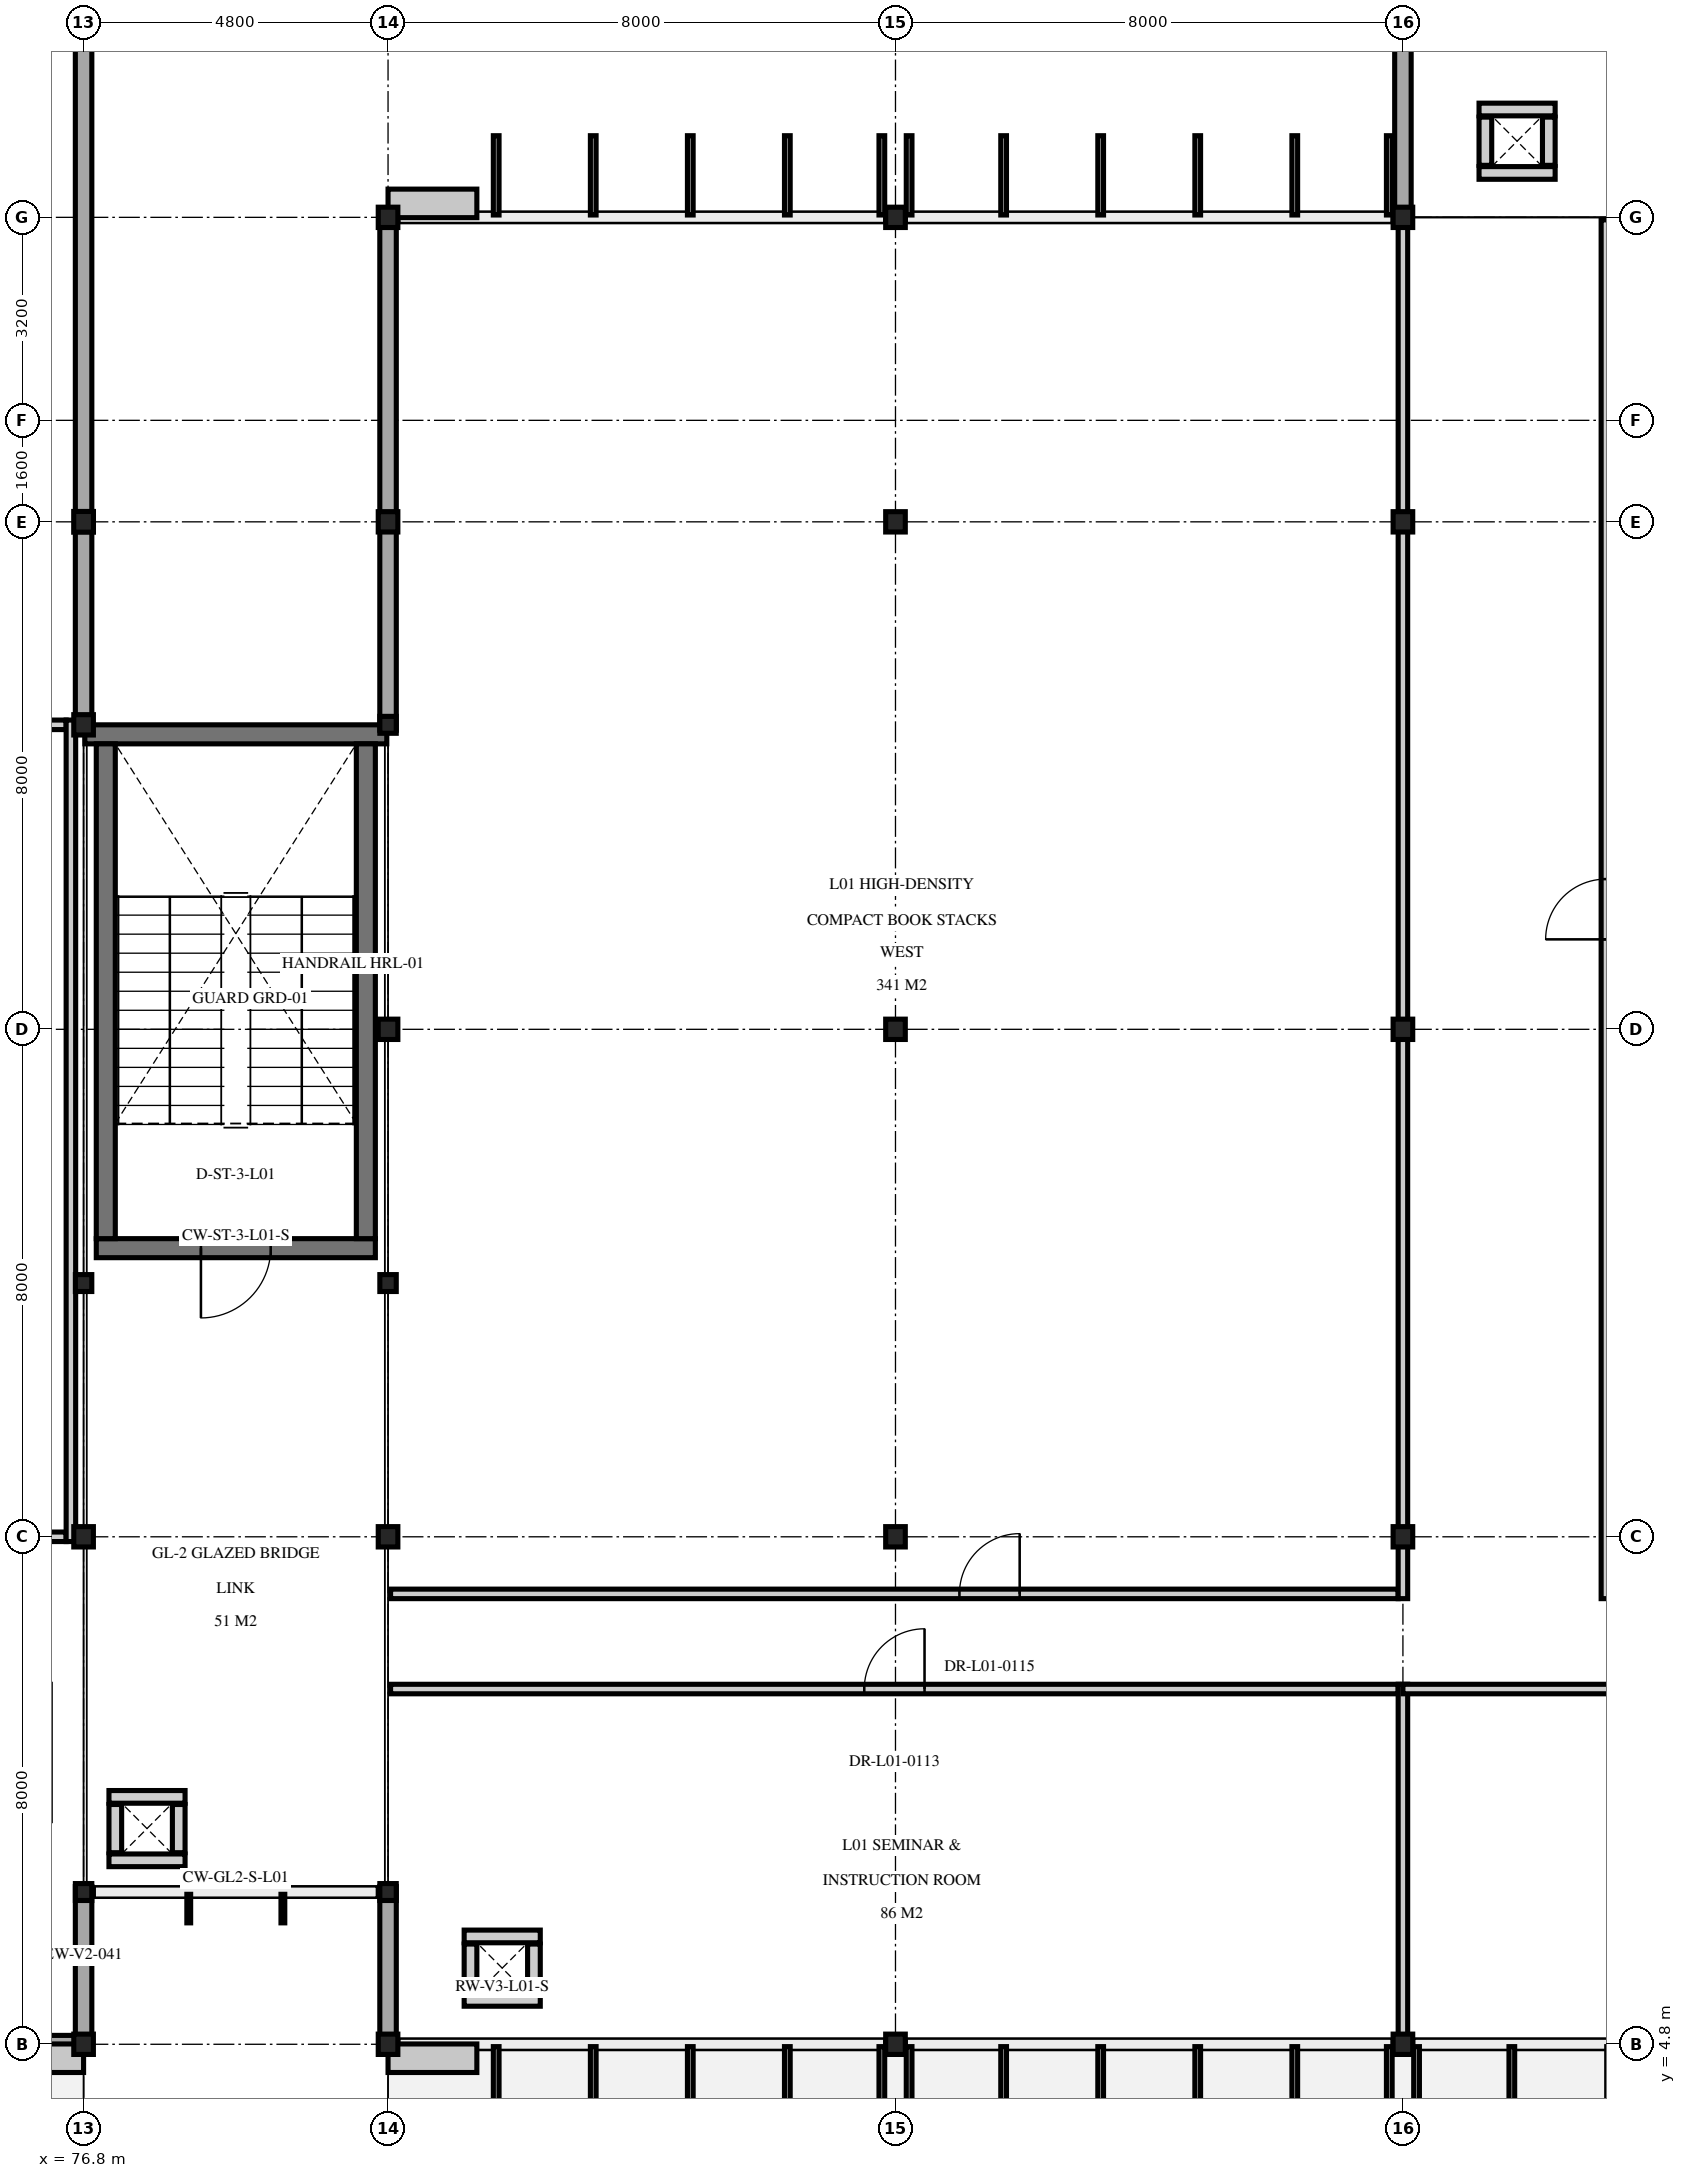
"""IFC4 building model, lengths in metres.
Left out: names, types, materials, properties, quantities, classifications, styles, units other than length and angle.
Written with IfcOpenShell. Run it as: python <this file> out.ifc"""

import sys

from ifc_helpers import new_model, si_unit, direction, frame, frame_2d, origin, origin_2d, place, context, subcontext, project, spatial, rectangle, i_section, extrude, element, fill, save


model = new_model("IFC4")
c1 = context("Model", 3, precision=1e-05, world=origin(), true_north=direction((0.0, 1.0)))
c2 = subcontext(c1, "Body", "Model", "MODEL_VIEW")
j1 = project(units=[si_unit("LENGTHUNIT", "METRE"), si_unit("PLANEANGLEUNIT", "RADIAN")], contexts=[c1])
p1 = place(None, origin())
s1 = spatial("IfcSite", under=j1, at=p1, CompositionType="ELEMENT")
p2 = place(p1, origin())
s2 = spatial("IfcBuilding", under=s1, at=p2, CompositionType="ELEMENT")
p3 = place(p2, frame((0.0, 0.0, 5.1)))
s3 = spatial("IfcBuildingStorey", under=s2, at=p3, CompositionType="ELEMENT", Elevation=5.1)
for number, where, z_axis, x_axis in (
    (1, (76.8, 4.8, 0.0), (0.0, 0.0, 1.0), (1.0, 0.0, 0.0)),
    (2, (76.8, 12.8, 0.0), (0.0, 0.0, 1.0), (1.0, 0.0, 0.0)),
    (3, (76.8, 25.6, 0.0), (0.0, 0.0, 1.0), (1.0, 0.0, 0.0)),
):
    element("IfcColumn", number, at=place(p3, frame(where, z_axis=z_axis, x_axis=x_axis)), inside=s3, PredefinedType="COLUMN", context=c2, shape_type="SweptSolid", body=[
        extrude(i_section(OverallWidth=0.309, OverallDepth=0.321, WebThickness=0.014, FlangeThickness=0.022, at=origin_2d()), origin(), (0.0, 0.0, 1.0), 4.5),
    ])
p4 = place(p3, frame((76.8, 28.8, 0.0), z_axis=(0.0, 0.0, 1.0), x_axis=(1.0, 0.0, 0.0)))
e4 = element("IfcColumn", 4, at=p4, inside=s3, PredefinedType="COLUMN", context=c2, shape_type="SweptSolid", body=[
    extrude(i_section(OverallWidth=0.311, OverallDepth=0.327, WebThickness=0.016, FlangeThickness=0.025, at=origin_2d()), origin(), (0.0, 0.0, 1.0), 4.5),
])
for number, where, z_axis, x_axis in (
    (5, (76.8, 7.2, 0.0), (0.0, 0.0, 1.0), (1.0, 0.0, 0.0)),
    (6, (76.8, 16.8, 0.0), (0.0, 0.0, 1.0), (1.0, 0.0, 0.0)),
):
    element("IfcColumn", number, at=place(p3, frame(where, z_axis=z_axis, x_axis=x_axis)), inside=s3, PredefinedType="COLUMN", context=c2, shape_type="SweptSolid", body=[
        extrude(i_section(OverallWidth=0.259, OverallDepth=0.267, WebThickness=0.013, FlangeThickness=0.021, at=origin_2d()), origin(), (0.0, 0.0, 1.0), 4.5),
    ])
for number, where, z_axis, x_axis in (
    (7, (81.6, 4.8, 0.0), (0.0, 0.0, 1.0), (1.0, 0.0, 0.0)),
    (8, (81.6, 12.8, 0.0), (0.0, 0.0, 1.0), (1.0, 0.0, 0.0)),
    (9, (81.6, 20.8, 0.0), (0.0, 0.0, 1.0), (1.0, 0.0, 0.0)),
    (10, (81.6, 28.8, 0.0), (0.0, 0.0, 1.0), (1.0, 0.0, 0.0)),
    (11, (81.6, 33.6, 0.0), (0.0, 0.0, 1.0), (1.0, 0.0, 0.0)),
    (12, (89.6, 4.8, 0.0), (0.0, 0.0, 1.0), (1.0, 0.0, 0.0)),
    (13, (89.6, 12.8, 0.0), (0.0, 0.0, 1.0), (1.0, 0.0, 0.0)),
    (14, (89.6, 20.8, 0.0), (0.0, 0.0, 1.0), (1.0, 0.0, 0.0)),
    (15, (89.6, 28.8, 0.0), (0.0, 0.0, 1.0), (1.0, 0.0, 0.0)),
    (16, (89.6, 33.6, 0.0), (0.0, 0.0, 1.0), (1.0, 0.0, 0.0)),
    (17, (97.6, 4.8, 0.0), (0.0, 0.0, 1.0), (1.0, 0.0, 0.0)),
    (18, (97.6, 12.8, 0.0), (0.0, 0.0, 1.0), (1.0, 0.0, 0.0)),
    (19, (97.6, 20.8, 0.0), (0.0, 0.0, 1.0), (1.0, 0.0, 0.0)),
    (20, (97.6, 28.8, 0.0), (0.0, 0.0, 1.0), (1.0, 0.0, 0.0)),
    (21, (97.6, 33.6, 0.0), (0.0, 0.0, 1.0), (1.0, 0.0, 0.0)),
):
    element("IfcColumn", number, at=place(p3, frame(where, z_axis=z_axis, x_axis=x_axis)), inside=s3, PredefinedType="COLUMN", context=c2, shape_type="SweptSolid", body=[
        extrude(i_section(OverallWidth=0.309, OverallDepth=0.321, WebThickness=0.014, FlangeThickness=0.022, at=origin_2d()), origin(), (0.0, 0.0, 1.0), 4.5),
    ])
for number, where, z_axis, x_axis in (
    (22, (81.6, 7.2, 0.0), (0.0, 0.0, 1.0), (1.0, 0.0, 0.0)),
    (23, (81.6, 16.8, 0.0), (0.0, 0.0, 1.0), (1.0, 0.0, 0.0)),
    (24, (81.6, 25.6, 0.0), (0.0, 0.0, 1.0), (1.0, 0.0, 0.0)),
):
    element("IfcColumn", number, at=place(p3, frame(where, z_axis=z_axis, x_axis=x_axis)), inside=s3, PredefinedType="COLUMN", context=c2, shape_type="SweptSolid", body=[
        extrude(i_section(OverallWidth=0.259, OverallDepth=0.267, WebThickness=0.013, FlangeThickness=0.021, at=origin_2d()), origin(), (0.0, 0.0, 1.0), 4.5),
    ])
p5 = place(p3, frame((81.4, 17.35, 0.0), z_axis=(0.0, 0.0, 1.0), x_axis=(-1.0, 0.0, 0.0)))
e25 = element("IfcWall", 25, at=p5, inside=s3, PredefinedType="SHEAR", context=c2, shape_type="SweptSolid", body=[
    extrude(rectangle(XDim=4.4, YDim=0.3, at=frame_2d((2.2, 0.0))), origin(), (0.0, 0.0, 1.0), 4.29),
])
p6 = place(p5, frame((1.65, 0.0, 0.0)))
e26 = element("IfcOpeningElement", 26, at=p6, cuts=e25, PredefinedType="OPENING", context=c2, shape_type="SweptSolid", body=[
    extrude(rectangle(XDim=1.1, YDim=2.2, at=frame_2d((0.55, 1.1))), frame((0.0, 0.16, 0.0), z_axis=(0.0, -1.0, 0.0), x_axis=(1.0, 0.0, 0.0)), (0.0, 0.0, 1.0), 0.32),
])
p7 = place(p3, frame((76.82, 25.45, 0.0), z_axis=(0.0, 0.0, 1.0), x_axis=(1.0, 0.0, 0.0)))
e27 = element("IfcWall", 27, at=p7, inside=s3, PredefinedType="SHEAR", context=c2, shape_type="SweptSolid", body=[
    extrude(rectangle(XDim=4.76, YDim=0.3, at=frame_2d((2.38, 0.0))), origin(), (0.0, 0.0, 1.0), 4.29),
])
for number, where, z_axis, x_axis in (
    (28, (77.15, 17.5, 0.0), (0.0, 0.0, 1.0), (0.0, 1.0, 0.0)),
    (29, (81.25, 25.3, 0.0), (0.0, 0.0, 1.0), (0.0, -1.0, 0.0)),
):
    element("IfcWall", number, at=place(p3, frame(where, z_axis=z_axis, x_axis=x_axis)), inside=s3, PredefinedType="SHEAR", context=c2, shape_type="SweptSolid", body=[
        extrude(rectangle(XDim=7.8, YDim=0.3, at=frame_2d((3.9, 0.0))), origin(), (0.0, 0.0, 1.0), 4.29),
    ])
for number, where, z_axis, x_axis in (
    (30, (84.0, 5.5, 0.0), (0.0, 0.0, 1.0), (-1.0, 0.0, 0.0)),
    (31, (82.8, 6.5, 0.0), (0.0, 0.0, 1.0), (1.0, 0.0, 0.0)),
):
    element("IfcWall", number, at=place(p3, frame(where, z_axis=z_axis, x_axis=x_axis)), inside=s3, PredefinedType="PARTITIONING", context=c2, shape_type="SweptSolid", body=[
        extrude(rectangle(XDim=1.2, YDim=0.2, at=frame_2d((0.6, 0.0))), origin(), (0.0, 0.0, 1.0), 3.79),
    ])
for number, where, z_axis, x_axis in (
    (32, (82.9, 5.62, 0.0), (0.0, 0.0, 1.0), (0.0, 1.0, 0.0)),
    (33, (83.9, 6.38, 0.0), (0.0, 0.0, 1.0), (0.0, -1.0, 0.0)),
):
    element("IfcWall", number, at=place(p3, frame(where, z_axis=z_axis, x_axis=x_axis)), inside=s3, PredefinedType="PARTITIONING", context=c2, shape_type="SweptSolid", body=[
        extrude(rectangle(XDim=0.76, YDim=0.2, at=frame_2d((0.38, 0.0))), origin(), (0.0, 0.0, 1.0), 3.79),
    ])
for number, where, z_axis, x_axis in (
    (34, (78.4, 7.7, 0.0), (0.0, 0.0, 1.0), (-1.0, 0.0, 0.0)),
    (35, (77.2, 8.7, 0.0), (0.0, 0.0, 1.0), (1.0, 0.0, 0.0)),
):
    element("IfcWall", number, at=place(p3, frame(where, z_axis=z_axis, x_axis=x_axis)), inside=s3, PredefinedType="PARTITIONING", context=c2, shape_type="SweptSolid", body=[
        extrude(rectangle(XDim=1.2, YDim=0.2, at=frame_2d((0.6, 0.0))), origin(), (0.0, 0.0, 1.0), 3.79),
    ])
for number, where, z_axis, x_axis in (
    (36, (77.3, 7.82, 0.0), (0.0, 0.0, 1.0), (0.0, 1.0, 0.0)),
    (37, (78.3, 8.58, 0.0), (0.0, 0.0, 1.0), (0.0, -1.0, 0.0)),
):
    element("IfcWall", number, at=place(p3, frame(where, z_axis=z_axis, x_axis=x_axis)), inside=s3, PredefinedType="PARTITIONING", context=c2, shape_type="SweptSolid", body=[
        extrude(rectangle(XDim=0.76, YDim=0.2, at=frame_2d((0.38, 0.0))), origin(), (0.0, 0.0, 1.0), 3.79),
    ])
for number, where, z_axis, x_axis in (
    (38, (100.0, 34.3, 0.0), (0.0, 0.0, 1.0), (-1.0, 0.0, 0.0)),
    (39, (98.8, 35.3, 0.0), (0.0, 0.0, 1.0), (1.0, 0.0, 0.0)),
):
    element("IfcWall", number, at=place(p3, frame(where, z_axis=z_axis, x_axis=x_axis)), inside=s3, PredefinedType="PARTITIONING", context=c2, shape_type="SweptSolid", body=[
        extrude(rectangle(XDim=1.2, YDim=0.2, at=frame_2d((0.6, 0.0))), origin(), (0.0, 0.0, 1.0), 3.755),
    ])
for number, where, z_axis, x_axis in (
    (40, (98.9, 34.42, 0.0), (0.0, 0.0, 1.0), (0.0, 1.0, 0.0)),
    (41, (99.9, 35.18, 0.0), (0.0, 0.0, 1.0), (0.0, -1.0, 0.0)),
):
    element("IfcWall", number, at=place(p3, frame(where, z_axis=z_axis, x_axis=x_axis)), inside=s3, PredefinedType="PARTITIONING", context=c2, shape_type="SweptSolid", body=[
        extrude(rectangle(XDim=0.76, YDim=0.2, at=frame_2d((0.38, 0.0))), origin(), (0.0, 0.0, 1.0), 3.755),
    ])
p8 = place(p3, frame((76.885, 4.8, 0.0), z_axis=(0.0, 0.0, 1.0), x_axis=(-1.0, 0.0, 0.0)))
e42 = element("IfcWall", 42, at=p8, inside=s3, PredefinedType="SOLIDWALL", context=c2, shape_type="SweptSolid", body=[
    extrude(rectangle(XDim=9.77, YDim=0.28, at=frame_2d((4.885, 0.0))), origin(), (0.0, 0.0, 1.0), 3.765),
])
p9 = place(p8, frame((3.685, 0.0, 0.95)))
e43 = element("IfcOpeningElement", 43, at=p9, cuts=e42, PredefinedType="OPENING", context=c2, shape_type="SweptSolid", body=[
    extrude(rectangle(XDim=2.4, YDim=2.1, at=frame_2d((1.2, 1.05))), frame((0.0, 0.15, 0.0), z_axis=(0.0, -1.0, 0.0), x_axis=(1.0, 0.0, 0.0)), (0.0, 0.0, 1.0), 0.3),
])
p10 = place(p3, frame((76.8, 7.285, 0.0), z_axis=(0.0, 0.0, 1.0), x_axis=(0.0, -1.0, 0.0)))
e44 = element("IfcWall", 44, at=p10, inside=s3, PredefinedType="SOLIDWALL", context=c2, shape_type="SweptSolid", body=[
    extrude(rectangle(XDim=2.57, YDim=0.26, at=frame_2d((1.285, 0.0))), origin(), (0.0, 0.0, 1.0), 3.765),
])
p11 = place(p3, frame((76.8, 36.885, 0.0), z_axis=(0.0, 0.0, 1.0), x_axis=(0.0, -1.0, 0.0)))
e45 = element("IfcWall", 45, at=p11, inside=s3, PredefinedType="SOLIDWALL", context=c2, shape_type="SweptSolid", body=[
    extrude(rectangle(XDim=11.37, YDim=0.26, at=frame_2d((5.685, 0.0))), origin(), (0.0, 0.0, 1.0), 3.765),
])
p12 = place(p3, frame((81.6, 4.715, 0.0), z_axis=(0.0, 0.0, 1.0), x_axis=(0.0, 1.0, 0.0)))
e46 = element("IfcWall", 46, at=p12, inside=s3, PredefinedType="SOLIDWALL", context=c2, shape_type="SweptSolid", body=[
    extrude(rectangle(XDim=2.57, YDim=0.26, at=frame_2d((1.285, 0.0))), origin(), (0.0, 0.0, 1.0), 3.715),
])
p13 = place(p3, frame((81.6, 25.515, 0.0), z_axis=(0.0, 0.0, 1.0), x_axis=(0.0, 1.0, 0.0)))
e47 = element("IfcWall", 47, at=p13, inside=s3, PredefinedType="SOLIDWALL", context=c2, shape_type="SweptSolid", body=[
    extrude(rectangle(XDim=8.17, YDim=0.26, at=frame_2d((4.085, 0.0))), origin(), (0.0, 0.0, 1.0), 3.715),
])
p14 = place(p3, frame((97.6, 33.515, 0.0), z_axis=(0.0, 0.0, 1.0), x_axis=(0.0, 1.0, 0.0)))
e48 = element("IfcWall", 48, at=p14, inside=s3, PredefinedType="SOLIDWALL", context=c2, shape_type="SweptSolid", body=[
    extrude(rectangle(XDim=16.17, YDim=0.26, at=frame_2d((8.085, 0.0))), origin(), (0.0, 0.0, 1.0), 1.927),
])
for number, where, z_axis, x_axis in (
    (49, (67.275, 12.8, 0.0), (0.0, 0.0, 1.0), (1.0, 0.0, 0.0)),
    (50, (67.275, 25.6, 0.0), (0.0, 0.0, 1.0), (1.0, 0.0, 0.0)),
):
    element("IfcWall", number, at=place(p3, frame(where, z_axis=z_axis, x_axis=x_axis)), inside=s3, PredefinedType="PARTITIONING", context=c2, shape_type="SweptSolid", body=[
        extrude(rectangle(XDim=9.25, YDim=0.15, at=frame_2d((4.625, 0.0))), origin(), (0.0, 0.0, 1.0), 3.765),
    ])
p15 = place(p3, frame((76.6, 12.725, 0.0), z_axis=(0.0, 0.0, 1.0), x_axis=(0.0, 1.0, 0.0)))
e51 = element("IfcWall", 51, at=p15, inside=s3, PredefinedType="PARTITIONING", context=c2, shape_type="SweptSolid", body=[
    extrude(rectangle(XDim=12.95, YDim=0.15, at=frame_2d((6.475, 0.0))), origin(), (0.0, 0.0, 1.0), 3.765),
])
p16 = place(p3, frame((81.64, 10.4, 0.0), z_axis=(0.0, 0.0, 1.0), x_axis=(1.0, 0.0, 0.0)))
e52 = element("IfcWall", 52, at=p16, inside=s3, PredefinedType="PARTITIONING", context=c2, shape_type="SweptSolid", body=[
    extrude(rectangle(XDim=15.885, YDim=0.15, at=frame_2d((7.942, 0.0))), origin(), (0.0, 0.0, 1.0), 4.015),
])
p17 = place(p16, frame((7.468, 0.0, 0.0)))
e53 = element("IfcOpeningElement", 53, at=p17, cuts=e52, PredefinedType="OPENING", context=c2, shape_type="SweptSolid", body=[
    extrude(rectangle(XDim=0.95, YDim=2.15, at=frame_2d((0.475, 1.075))), frame((0.0, 0.085, 0.0), z_axis=(0.0, -1.0, 0.0), x_axis=(1.0, 0.0, 0.0)), (0.0, 0.0, 1.0), 0.17),
])
p18 = place(p3, frame((97.6, 4.84, 0.0), z_axis=(0.0, 0.0, 1.0), x_axis=(0.0, 1.0, 0.0)))
e54 = element("IfcWall", 54, at=p18, inside=s3, PredefinedType="PARTITIONING", context=c2, shape_type="SweptSolid", body=[
    extrude(rectangle(XDim=5.635, YDim=0.15, at=frame_2d((2.817, 0.0))), origin(), (0.0, 0.0, 1.0), 3.715),
])
p19 = place(p3, frame((97.6, 10.4, 0.0), z_axis=(0.0, 0.0, 1.0), x_axis=(1.0, 0.0, 0.0)))
e55 = element("IfcWall", 55, at=p19, inside=s3, PredefinedType="PARTITIONING", context=c2, shape_type="SweptSolid", body=[
    extrude(rectangle(XDim=14.6, YDim=0.15, at=frame_2d((7.3, 0.0))), origin(), (0.0, 0.0, 1.0), 4.015),
])
p20 = place(p19, frame((6.85, 0.0, 0.0)))
e56 = element("IfcOpeningElement", 56, at=p20, cuts=e55, PredefinedType="OPENING", context=c2, shape_type="SweptSolid", body=[
    extrude(rectangle(XDim=0.9, YDim=2.15, at=frame_2d((0.45, 1.075))), frame((0.0, 0.085, 0.0), z_axis=(0.0, -1.0, 0.0), x_axis=(1.0, 0.0, 0.0)), (0.0, 0.0, 1.0), 0.17),
])
p21 = place(p3, frame((81.64, 11.9, 0.0), z_axis=(0.0, 0.0, 1.0), x_axis=(1.0, 0.0, 0.0)))
e57 = element("IfcWall", 57, at=p21, inside=s3, PredefinedType="PARTITIONING", context=c2, shape_type="SweptSolid", body=[
    extrude(rectangle(XDim=15.885, YDim=0.15, at=frame_2d((7.942, 0.0))), origin(), (0.0, 0.0, 1.0), 4.015),
])
p22 = place(p21, frame((8.968, 0.0, 0.0)))
e58 = element("IfcOpeningElement", 58, at=p22, cuts=e57, PredefinedType="OPENING", context=c2, shape_type="SweptSolid", body=[
    extrude(rectangle(XDim=0.95, YDim=2.15, at=frame_2d((0.475, 1.075))), frame((0.0, 0.085, 0.0), z_axis=(0.0, -1.0, 0.0), x_axis=(1.0, 0.0, 0.0)), (0.0, 0.0, 1.0), 0.17),
])
p23 = place(p3, frame((97.6, 11.825, 0.0), z_axis=(0.0, 0.0, 1.0), x_axis=(0.0, 1.0, 0.0)))
e59 = element("IfcWall", 59, at=p23, inside=s3, PredefinedType="PARTITIONING", context=c2, shape_type="SweptSolid", body=[
    extrude(rectangle(XDim=21.735, YDim=0.15, at=frame_2d((10.868, 0.0))), origin(), (0.0, 0.0, 1.0), 3.715),
])
p24 = place(p3, frame((100.8, 11.825, 0.0), z_axis=(0.0, 0.0, 1.0), x_axis=(0.0, 1.0, 0.0)))
e60 = element("IfcWall", 60, at=p24, inside=s3, PredefinedType="PARTITIONING", context=c2, shape_type="SweptSolid", body=[
    extrude(rectangle(XDim=21.735, YDim=0.15, at=frame_2d((10.868, 0.0))), origin(), (0.0, 0.0, 1.0), 3.715),
])
p25 = place(p24, frame((10.393, 0.0, 0.0)))
e61 = element("IfcOpeningElement", 61, at=p25, cuts=e60, PredefinedType="OPENING", context=c2, shape_type="SweptSolid", body=[
    extrude(rectangle(XDim=0.95, YDim=2.15, at=frame_2d((0.475, 1.075))), frame((0.0, 0.085, 0.0), z_axis=(0.0, -1.0, 0.0), x_axis=(1.0, 0.0, 0.0)), (0.0, 0.0, 1.0), 0.17),
])
p26 = place(p6, origin())
e62 = element("IfcDoor", 62, at=p26, inside=s3, OperationType="SINGLE_SWING_RIGHT", PredefinedType="DOOR", context=c2, shape_type="SweptSolid", body=[
    extrude(rectangle(XDim=1.1, YDim=2.2, at=frame_2d((0.55, 1.1))), frame((0.0, 0.025, 0.0), z_axis=(0.0, -1.0, 0.0), x_axis=(1.0, 0.0, 0.0)), (0.0, 0.0, 1.0), 0.05),
])
fill(e26, e62)
p27 = place(p17, origin())
e63 = element("IfcDoor", 63, at=p27, inside=s3, OperationType="SINGLE_SWING_RIGHT", PredefinedType="DOOR", context=c2, shape_type="SweptSolid", body=[
    extrude(rectangle(XDim=0.95, YDim=2.15, at=frame_2d((0.475, 1.075))), frame((0.0, 0.025, 0.0), z_axis=(0.0, -1.0, 0.0), x_axis=(1.0, 0.0, 0.0)), (0.0, 0.0, 1.0), 0.05),
])
fill(e53, e63)
p28 = place(p22, origin())
e64 = element("IfcDoor", 64, at=p28, inside=s3, OperationType="SINGLE_SWING_RIGHT", PredefinedType="DOOR", context=c2, shape_type="SweptSolid", body=[
    extrude(rectangle(XDim=0.95, YDim=2.15, at=frame_2d((0.475, 1.075))), frame((0.0, 0.025, 0.0), z_axis=(0.0, -1.0, 0.0), x_axis=(1.0, 0.0, 0.0)), (0.0, 0.0, 1.0), 0.05),
])
fill(e58, e64)
p29 = place(p25, origin())
e65 = element("IfcDoor", 65, at=p29, inside=s3, OperationType="SINGLE_SWING_LEFT", PredefinedType="DOOR", context=c2, shape_type="SweptSolid", body=[
    extrude(rectangle(XDim=0.95, YDim=2.15, at=frame_2d((0.475, 1.075))), frame((0.0, 0.025, 0.0), z_axis=(0.0, -1.0, 0.0), x_axis=(1.0, 0.0, 0.0)), (0.0, 0.0, 1.0), 0.05),
])
fill(e61, e65)
save(model, sys.argv[1])
